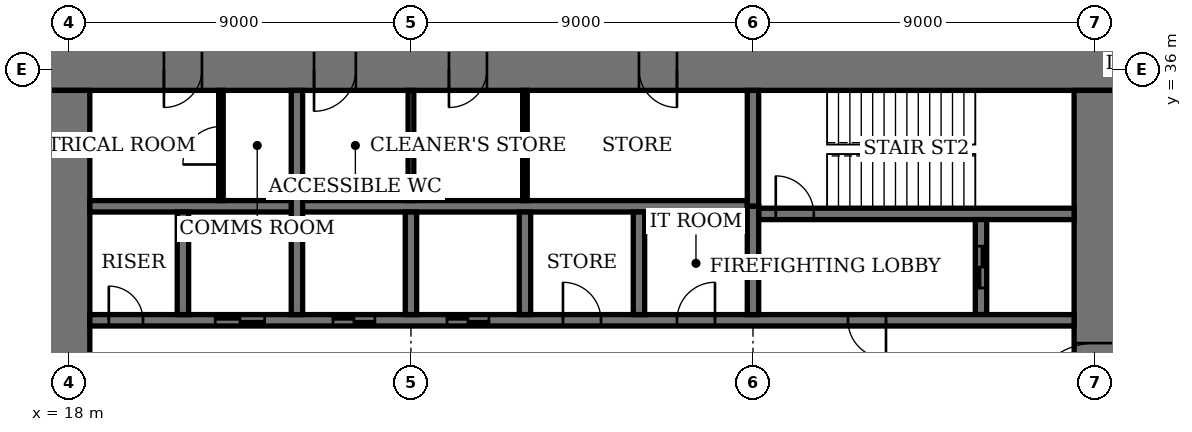
"""IFC4 building model, lengths in metres.
Left out: names, types, materials, properties, quantities, classifications, styles, units other than length and angle.
Written with IfcOpenShell. Run it as: python <this file> out.ifc"""

import sys

from ifc_helpers import new_model, si_unit, direction, frame, frame_2d, origin, place, context, subcontext, project, spatial, rectangle, extrude, element, fill, save


model = new_model("IFC4")
c1 = context("Model", 3, precision=1e-05, world=origin(), true_north=direction((0.0, 1.0)))
c2 = subcontext(c1, "Body", "Model", "MODEL_VIEW")
j1 = project(units=[si_unit("LENGTHUNIT", "METRE"), si_unit("PLANEANGLEUNIT", "RADIAN")], contexts=[c1])
p1 = place(None, origin())
s1 = spatial("IfcSite", under=j1, at=p1, CompositionType="ELEMENT")
p2 = place(p1, origin())
s2 = spatial("IfcBuilding", under=s1, at=p2, CompositionType="ELEMENT")
p3 = place(p2, frame((0.0, 0.0, 186.2)))
s3 = spatial("IfcBuildingStorey", under=s2, at=p3, CompositionType="ELEMENT", Elevation=186.2)
p4 = place(p3, frame((45.55, 36.0, 0.0), z_axis=(0.0, 0.0, 1.0), x_axis=(-1.0, 0.0, 0.0)))
e1 = element("IfcWall", 1, at=p4, inside=s3, PredefinedType="SHEAR", context=c2, shape_type="SweptSolid", body=[
    extrude(rectangle(XDim=28.1, YDim=1.1, at=frame_2d((14.05, 0.0))), origin(), (0.0, 0.0, 1.0), 4.0),
])
p5 = place(p4, frame((11.55, 0.0, 0.0)))
e2 = element("IfcOpeningElement", 2, at=p5, cuts=e1, PredefinedType="OPENING", context=c2, shape_type="SweptSolid", body=[
    extrude(rectangle(XDim=1.0, YDim=2.4, at=frame_2d((0.5, 1.2))), frame((0.0, 0.56, 0.0), z_axis=(0.0, -1.0, 0.0), x_axis=(1.0, 0.0, 0.0)), (0.0, 0.0, 1.0), 1.12),
])
p6 = place(p4, frame((16.55, 0.0, 0.0)))
e3 = element("IfcOpeningElement", 3, at=p6, cuts=e1, PredefinedType="OPENING", context=c2, shape_type="SweptSolid", body=[
    extrude(rectangle(XDim=1.0, YDim=2.4, at=frame_2d((0.5, 1.2))), frame((0.0, 0.56, 0.0), z_axis=(0.0, -1.0, 0.0), x_axis=(1.0, 0.0, 0.0)), (0.0, 0.0, 1.0), 1.12),
])
p7 = place(p4, frame((20.0, 0.0, 0.0)))
e4 = element("IfcOpeningElement", 4, at=p7, cuts=e1, PredefinedType="OPENING", context=c2, shape_type="SweptSolid", body=[
    extrude(rectangle(XDim=1.1, YDim=2.4, at=frame_2d((0.55, 1.2))), frame((0.0, 0.56, 0.0), z_axis=(0.0, -1.0, 0.0), x_axis=(1.0, 0.0, 0.0)), (0.0, 0.0, 1.0), 1.12),
])
p8 = place(p4, frame((24.05, 0.0, 0.0)))
e5 = element("IfcOpeningElement", 5, at=p8, cuts=e1, PredefinedType="OPENING", context=c2, shape_type="SweptSolid", body=[
    extrude(rectangle(XDim=1.0, YDim=2.4, at=frame_2d((0.5, 1.2))), frame((0.0, 0.56, 0.0), z_axis=(0.0, -1.0, 0.0), x_axis=(1.0, 0.0, 0.0)), (0.0, 0.0, 1.0), 1.12),
])
p9 = place(p3, frame((18.0, 35.45, 0.0), z_axis=(0.0, 0.0, 1.0), x_axis=(0.0, -1.0, 0.0)))
e6 = element("IfcWall", 6, at=p9, inside=s3, PredefinedType="SHEAR", context=c2, shape_type="SweptSolid", body=[
    extrude(rectangle(XDim=16.9, YDim=1.1, at=frame_2d((8.45, 0.0))), origin(), (0.0, 0.0, 1.0), 4.0),
])
p10 = place(p9, frame((8.45, 0.0, 0.0)))
e7 = element("IfcOpeningElement", 7, at=p10, cuts=e6, PredefinedType="OPENING", context=c2, shape_type="SweptSolid", body=[
    extrude(rectangle(XDim=1.8, YDim=2.4, at=frame_2d((0.9, 1.2))), frame((0.0, 0.56, 0.0), z_axis=(0.0, -1.0, 0.0), x_axis=(1.0, 0.0, 0.0)), (0.0, 0.0, 1.0), 1.12),
])
p11 = place(p3, frame((45.0, 18.55, 0.0), z_axis=(0.0, 0.0, 1.0), x_axis=(0.0, 1.0, 0.0)))
e8 = element("IfcWall", 8, at=p11, inside=s3, PredefinedType="SHEAR", context=c2, shape_type="SweptSolid", body=[
    extrude(rectangle(XDim=16.9, YDim=1.1, at=frame_2d((8.45, 0.0))), origin(), (0.0, 0.0, 1.0), 4.0),
])
p12 = place(p11, frame((8.45, 0.0, 0.0)))
e9 = element("IfcOpeningElement", 9, at=p12, cuts=e8, PredefinedType="OPENING", context=c2, shape_type="SweptSolid", body=[
    extrude(rectangle(XDim=1.8, YDim=2.4, at=frame_2d((0.9, 1.2))), frame((0.0, 0.56, 0.0), z_axis=(0.0, -1.0, 0.0), x_axis=(1.0, 0.0, 0.0)), (0.0, 0.0, 1.0), 1.12),
])
p13 = place(p3, frame((36.15, 32.2, 0.0), z_axis=(0.0, 0.0, 1.0), x_axis=(1.0, 0.0, 0.0)))
e10 = element("IfcWall", 10, at=p13, inside=s3, PredefinedType="SHEAR", context=c2, shape_type="SweptSolid", body=[
    extrude(rectangle(XDim=8.3, YDim=0.3, at=frame_2d((4.15, 0.0))), origin(), (0.0, 0.0, 1.0), 4.0),
])
p14 = place(p13, frame((0.45, 0.0, 0.0)))
e11 = element("IfcOpeningElement", 11, at=p14, cuts=e10, PredefinedType="OPENING", context=c2, shape_type="SweptSolid", body=[
    extrude(rectangle(XDim=1.0, YDim=2.4, at=frame_2d((0.5, 1.2))), frame((0.0, 0.16, 0.0), z_axis=(0.0, -1.0, 0.0), x_axis=(1.0, 0.0, 0.0)), (0.0, 0.0, 1.0), 0.32),
])
p15 = place(p3, frame((36.0, 32.4, 0.0), z_axis=(0.0, 0.0, 1.0), x_axis=(0.0, 1.0, 0.0)))
e12 = element("IfcWall", 12, at=p15, inside=s3, PredefinedType="SHEAR", context=c2, shape_type="SweptSolid", body=[
    extrude(rectangle(XDim=3.05, YDim=0.3, at=frame_2d((1.525, 0.0))), origin(), (0.0, 0.0, 1.0), 4.0),
])
p16 = place(p3, frame((42.0, 29.55, 0.0), z_axis=(0.0, 0.0, 1.0), x_axis=(0.0, 1.0, 0.0)))
e13 = element("IfcWall", 13, at=p16, inside=s3, PredefinedType="SHEAR", context=c2, shape_type="SweptSolid", body=[
    extrude(rectangle(XDim=2.5, YDim=0.3, at=frame_2d((1.25, 0.0))), origin(), (0.0, 0.0, 1.0), 4.0),
])
p17 = place(p16, frame((0.7, 0.0, 0.0)))
e14 = element("IfcOpeningElement", 14, at=p17, cuts=e13, PredefinedType="OPENING", context=c2, shape_type="SweptSolid", body=[
    extrude(rectangle(XDim=1.1, YDim=2.4, at=frame_2d((0.55, 1.2))), frame((0.0, 0.16, 0.0), z_axis=(0.0, -1.0, 0.0), x_axis=(1.0, 0.0, 0.0)), (0.0, 0.0, 1.0), 0.32),
])
p18 = place(p3, frame((18.55, 29.4, 0.0), z_axis=(0.0, 0.0, 1.0), x_axis=(1.0, 0.0, 0.0)))
e15 = element("IfcWall", 15, at=p18, inside=s3, PredefinedType="SHEAR", context=c2, shape_type="SweptSolid", body=[
    extrude(rectangle(XDim=25.9, YDim=0.3, at=frame_2d((12.95, 0.0))), origin(), (0.0, 0.0, 1.0), 4.0),
])
p19 = place(p18, frame((19.95, 0.0, 0.0)))
e16 = element("IfcOpeningElement", 16, at=p19, cuts=e15, PredefinedType="OPENING", context=c2, shape_type="SweptSolid", body=[
    extrude(rectangle(XDim=1.0, YDim=2.4, at=frame_2d((0.5, 1.2))), frame((0.0, 0.16, 0.0), z_axis=(0.0, -1.0, 0.0), x_axis=(1.0, 0.0, 0.0)), (0.0, 0.0, 1.0), 0.32),
])
p20 = place(p18, frame((0.5, 0.0, 0.0)))
e17 = element("IfcOpeningElement", 17, at=p20, cuts=e15, PredefinedType="OPENING", context=c2, shape_type="SweptSolid", body=[
    extrude(rectangle(XDim=0.9, YDim=2.1, at=frame_2d((0.45, 1.05))), frame((0.0, 0.16, 0.0), z_axis=(0.0, -1.0, 0.0), x_axis=(1.0, 0.0, 0.0)), (0.0, 0.0, 1.0), 0.32),
])
p21 = place(p18, frame((15.45, 0.0, 0.0)))
e18 = element("IfcOpeningElement", 18, at=p21, cuts=e15, PredefinedType="OPENING", context=c2, shape_type="SweptSolid", body=[
    extrude(rectangle(XDim=1.0, YDim=2.4, at=frame_2d((0.5, 1.2))), frame((0.0, 0.16, 0.0), z_axis=(0.0, -1.0, 0.0), x_axis=(1.0, 0.0, 0.0)), (0.0, 0.0, 1.0), 0.32),
])
p22 = place(p18, frame((12.45, 0.0, 0.0)))
e19 = element("IfcOpeningElement", 19, at=p22, cuts=e15, PredefinedType="OPENING", context=c2, shape_type="SweptSolid", body=[
    extrude(rectangle(XDim=1.0, YDim=2.4, at=frame_2d((0.5, 1.2))), frame((0.0, 0.16, 0.0), z_axis=(0.0, -1.0, 0.0), x_axis=(1.0, 0.0, 0.0)), (0.0, 0.0, 1.0), 0.32),
])
p23 = place(p18, frame((9.4, 0.0, 0.0)))
e20 = element("IfcOpeningElement", 20, at=p23, cuts=e15, PredefinedType="OPENING", context=c2, shape_type="SweptSolid", body=[
    extrude(rectangle(XDim=1.1, YDim=2.4, at=frame_2d((0.55, 1.2))), frame((0.0, 0.16, 0.0), z_axis=(0.0, -1.0, 0.0), x_axis=(1.0, 0.0, 0.0)), (0.0, 0.0, 1.0), 0.32),
])
p24 = place(p18, frame((6.4, 0.0, 0.0)))
e21 = element("IfcOpeningElement", 21, at=p24, cuts=e15, PredefinedType="OPENING", context=c2, shape_type="SweptSolid", body=[
    extrude(rectangle(XDim=1.1, YDim=2.4, at=frame_2d((0.55, 1.2))), frame((0.0, 0.16, 0.0), z_axis=(0.0, -1.0, 0.0), x_axis=(1.0, 0.0, 0.0)), (0.0, 0.0, 1.0), 0.32),
])
p25 = place(p18, frame((3.3, 0.0, 0.0)))
e22 = element("IfcOpeningElement", 22, at=p25, cuts=e15, PredefinedType="OPENING", context=c2, shape_type="SweptSolid", body=[
    extrude(rectangle(XDim=1.3, YDim=2.4, at=frame_2d((0.65, 1.2))), frame((0.0, 0.16, 0.0), z_axis=(0.0, -1.0, 0.0), x_axis=(1.0, 0.0, 0.0)), (0.0, 0.0, 1.0), 0.32),
])
p26 = place(p3, frame((18.55, 32.4, 0.0), z_axis=(0.0, 0.0, 1.0), x_axis=(1.0, 0.0, 0.0)))
e23 = element("IfcWall", 23, at=p26, inside=s3, PredefinedType="SHEAR", context=c2, shape_type="SweptSolid", body=[
    extrude(rectangle(XDim=17.3, YDim=0.3, at=frame_2d((8.65, 0.0))), origin(), (0.0, 0.0, 1.0), 4.0),
])
for number, where, z_axis, x_axis in (
    (24, (33.0, 29.55, 0.0), (0.0, 0.0, 1.0), (0.0, 1.0, 0.0)),
    (25, (30.0, 29.55, 0.0), (0.0, 0.0, 1.0), (0.0, 1.0, 0.0)),
    (26, (27.0, 29.55, 0.0), (0.0, 0.0, 1.0), (0.0, 1.0, 0.0)),
):
    element("IfcWall", number, at=place(p3, frame(where, z_axis=z_axis, x_axis=x_axis)), inside=s3, PredefinedType="SHEAR", context=c2, shape_type="SweptSolid", body=[
        extrude(rectangle(XDim=2.7, YDim=0.3, at=frame_2d((1.35, 0.0))), origin(), (0.0, 0.0, 1.0), 4.0),
    ])
p27 = place(p3, frame((24.0, 29.55, 0.0), z_axis=(0.0, 0.0, 1.0), x_axis=(0.0, 1.0, 0.0)))
e27 = element("IfcWall", 27, at=p27, inside=s3, PredefinedType="SHEAR", context=c2, shape_type="SweptSolid", body=[
    extrude(rectangle(XDim=5.9, YDim=0.3, at=frame_2d((2.95, 0.0))), origin(), (0.0, 0.0, 1.0), 4.0),
])
p28 = place(p3, frame((21.0, 29.55, 0.0), z_axis=(0.0, 0.0, 1.0), x_axis=(0.0, 1.0, 0.0)))
e28 = element("IfcWall", 28, at=p28, inside=s3, PredefinedType="SHEAR", context=c2, shape_type="SweptSolid", body=[
    extrude(rectangle(XDim=2.7, YDim=0.3, at=frame_2d((1.35, 0.0))), origin(), (0.0, 0.0, 1.0), 4.0),
])
p29 = place(p3, frame((36.0, 29.55, 0.0), z_axis=(0.0, 0.0, 1.0), x_axis=(0.0, 1.0, 0.0)))
e29 = element("IfcWall", 29, at=p29, inside=s3, PredefinedType="SHEAR", context=c2, shape_type="SweptSolid", body=[
    extrude(rectangle(XDim=2.85, YDim=0.3, at=frame_2d((1.425, 0.0))), origin(), (0.0, 0.0, 1.0), 4.0),
])
p30 = place(p3, frame((30.0, 32.55, 0.0), z_axis=(0.0, 0.0, 1.0), x_axis=(0.0, 1.0, 0.0)))
e30 = element("IfcWall", 30, at=p30, inside=s3, PredefinedType="PARTITIONING", context=c2, shape_type="SweptSolid", body=[
    extrude(rectangle(XDim=2.9, YDim=0.12, at=frame_2d((1.45, 0.0))), origin(), (0.0, 0.0, 1.0), 3.75),
])
p31 = place(p3, frame((27.0, 32.55, 0.0), z_axis=(0.0, 0.0, 1.0), x_axis=(0.0, 1.0, 0.0)))
e31 = element("IfcWall", 31, at=p31, inside=s3, PredefinedType="PARTITIONING", context=c2, shape_type="SweptSolid", body=[
    extrude(rectangle(XDim=2.9, YDim=0.15, at=frame_2d((1.45, 0.0))), origin(), (0.0, 0.0, 1.0), 3.75),
])
p32 = place(p3, frame((22.0, 32.55, 0.0), z_axis=(0.0, 0.0, 1.0), x_axis=(0.0, 1.0, 0.0)))
e32 = element("IfcWall", 32, at=p32, inside=s3, PredefinedType="PARTITIONING", context=c2, shape_type="SweptSolid", body=[
    extrude(rectangle(XDim=2.9, YDim=0.12, at=frame_2d((1.45, 0.0))), origin(), (0.0, 0.0, 1.0), 3.75),
])
p33 = place(p32, frame((0.95, 0.0, 0.0)))
e33 = element("IfcOpeningElement", 33, at=p33, cuts=e32, PredefinedType="OPENING", context=c2, shape_type="SweptSolid", body=[
    extrude(rectangle(XDim=1.0, YDim=2.4, at=frame_2d((0.5, 1.2))), frame((0.0, 0.07, 0.0), z_axis=(0.0, -1.0, 0.0), x_axis=(1.0, 0.0, 0.0)), (0.0, 0.0, 1.0), 0.14),
])
p34 = place(p12, origin())
e34 = element("IfcDoor", 34, at=p34, inside=s3, OperationType="DOUBLE_DOOR_DOUBLE_SWING", PredefinedType="DOOR", context=c2, shape_type="SweptSolid", body=[
    extrude(rectangle(XDim=1.8, YDim=2.4, at=frame_2d((0.9, 1.2))), frame((0.0, 0.03, 0.0), z_axis=(0.0, -1.0, 0.0), x_axis=(1.0, 0.0, 0.0)), (0.0, 0.0, 1.0), 0.06),
    extrude(rectangle(XDim=0.04, YDim=2.4, at=frame_2d((0.02, 1.2))), frame((0.0, 0.55, 0.0), z_axis=(0.0, -1.0, 0.0), x_axis=(1.0, 0.0, 0.0)), (0.0, 0.0, 1.0), 1.1),
    extrude(rectangle(XDim=0.04, YDim=2.4, at=frame_2d((1.78, 1.2))), frame((0.0, 0.55, 0.0), z_axis=(0.0, -1.0, 0.0), x_axis=(1.0, 0.0, 0.0)), (0.0, 0.0, 1.0), 1.1),
    extrude(rectangle(XDim=1.8, YDim=0.04, at=frame_2d((0.9, 2.38))), frame((0.0, 0.55, 0.0), z_axis=(0.0, -1.0, 0.0), x_axis=(1.0, 0.0, 0.0)), (0.0, 0.0, 1.0), 1.1),
])
fill(e9, e34)
p35 = place(p5, origin())
e35 = element("IfcDoor", 35, at=p35, inside=s3, OperationType="SINGLE_SWING_RIGHT", PredefinedType="DOOR", context=c2, shape_type="SweptSolid", body=[
    extrude(rectangle(XDim=1.0, YDim=2.4, at=frame_2d((0.5, 1.2))), frame((0.0, 0.025, 0.0), z_axis=(0.0, -1.0, 0.0), x_axis=(1.0, 0.0, 0.0)), (0.0, 0.0, 1.0), 0.05),
    extrude(rectangle(XDim=0.04, YDim=2.4, at=frame_2d((0.02, 1.2))), frame((0.0, 0.4, 0.0), z_axis=(0.0, -1.0, 0.0), x_axis=(1.0, 0.0, 0.0)), (0.0, 0.0, 1.0), 0.8),
    extrude(rectangle(XDim=0.04, YDim=2.4, at=frame_2d((0.98, 1.2))), frame((0.0, 0.4, 0.0), z_axis=(0.0, -1.0, 0.0), x_axis=(1.0, 0.0, 0.0)), (0.0, 0.0, 1.0), 0.8),
    extrude(rectangle(XDim=1.0, YDim=0.04, at=frame_2d((0.5, 2.38))), frame((0.0, 0.4, 0.0), z_axis=(0.0, -1.0, 0.0), x_axis=(1.0, 0.0, 0.0)), (0.0, 0.0, 1.0), 0.8),
])
fill(e2, e35)
p36 = place(p6, origin())
e36 = element("IfcDoor", 36, at=p36, inside=s3, OperationType="SINGLE_SWING_LEFT", PredefinedType="DOOR", context=c2, shape_type="SweptSolid", body=[
    extrude(rectangle(XDim=1.0, YDim=2.4, at=frame_2d((0.5, 1.2))), frame((0.0, 0.025, 0.0), z_axis=(0.0, -1.0, 0.0), x_axis=(1.0, 0.0, 0.0)), (0.0, 0.0, 1.0), 0.05),
    extrude(rectangle(XDim=0.04, YDim=2.4, at=frame_2d((0.02, 1.2))), frame((0.0, 0.4, 0.0), z_axis=(0.0, -1.0, 0.0), x_axis=(1.0, 0.0, 0.0)), (0.0, 0.0, 1.0), 0.8),
    extrude(rectangle(XDim=0.04, YDim=2.4, at=frame_2d((0.98, 1.2))), frame((0.0, 0.4, 0.0), z_axis=(0.0, -1.0, 0.0), x_axis=(1.0, 0.0, 0.0)), (0.0, 0.0, 1.0), 0.8),
    extrude(rectangle(XDim=1.0, YDim=0.04, at=frame_2d((0.5, 2.38))), frame((0.0, 0.4, 0.0), z_axis=(0.0, -1.0, 0.0), x_axis=(1.0, 0.0, 0.0)), (0.0, 0.0, 1.0), 0.8),
])
fill(e3, e36)
p37 = place(p7, origin())
e37 = element("IfcDoor", 37, at=p37, inside=s3, OperationType="SINGLE_SWING_LEFT", PredefinedType="DOOR", context=c2, shape_type="SweptSolid", body=[
    extrude(rectangle(XDim=1.1, YDim=2.4, at=frame_2d((0.55, 1.2))), frame((0.0, 0.025, 0.0), z_axis=(0.0, -1.0, 0.0), x_axis=(1.0, 0.0, 0.0)), (0.0, 0.0, 1.0), 0.05),
    extrude(rectangle(XDim=0.04, YDim=2.4, at=frame_2d((0.02, 1.2))), frame((0.0, 0.44, 0.0), z_axis=(0.0, -1.0, 0.0), x_axis=(1.0, 0.0, 0.0)), (0.0, 0.0, 1.0), 0.88),
    extrude(rectangle(XDim=0.04, YDim=2.4, at=frame_2d((1.08, 1.2))), frame((0.0, 0.44, 0.0), z_axis=(0.0, -1.0, 0.0), x_axis=(1.0, 0.0, 0.0)), (0.0, 0.0, 1.0), 0.88),
    extrude(rectangle(XDim=1.1, YDim=0.04, at=frame_2d((0.55, 2.38))), frame((0.0, 0.44, 0.0), z_axis=(0.0, -1.0, 0.0), x_axis=(1.0, 0.0, 0.0)), (0.0, 0.0, 1.0), 0.88),
])
fill(e4, e37)
p38 = place(p8, origin())
e38 = element("IfcDoor", 38, at=p38, inside=s3, OperationType="SINGLE_SWING_LEFT", PredefinedType="DOOR", context=c2, shape_type="SweptSolid", body=[
    extrude(rectangle(XDim=1.0, YDim=2.4, at=frame_2d((0.5, 1.2))), frame((0.0, 0.025, 0.0), z_axis=(0.0, -1.0, 0.0), x_axis=(1.0, 0.0, 0.0)), (0.0, 0.0, 1.0), 0.05),
    extrude(rectangle(XDim=0.04, YDim=2.4, at=frame_2d((0.02, 1.2))), frame((0.0, 0.4, 0.0), z_axis=(0.0, -1.0, 0.0), x_axis=(1.0, 0.0, 0.0)), (0.0, 0.0, 1.0), 0.8),
    extrude(rectangle(XDim=0.04, YDim=2.4, at=frame_2d((0.98, 1.2))), frame((0.0, 0.4, 0.0), z_axis=(0.0, -1.0, 0.0), x_axis=(1.0, 0.0, 0.0)), (0.0, 0.0, 1.0), 0.8),
    extrude(rectangle(XDim=1.0, YDim=0.04, at=frame_2d((0.5, 2.38))), frame((0.0, 0.4, 0.0), z_axis=(0.0, -1.0, 0.0), x_axis=(1.0, 0.0, 0.0)), (0.0, 0.0, 1.0), 0.8),
])
fill(e5, e38)
p39 = place(p14, origin())
e39 = element("IfcDoor", 39, at=p39, inside=s3, OperationType="SINGLE_SWING_RIGHT", PredefinedType="DOOR", context=c2, shape_type="SweptSolid", body=[
    extrude(rectangle(XDim=1.0, YDim=2.4, at=frame_2d((0.5, 1.2))), frame((0.0, 0.03, 0.0), z_axis=(0.0, -1.0, 0.0), x_axis=(1.0, 0.0, 0.0)), (0.0, 0.0, 1.0), 0.06),
])
fill(e11, e39)
p40 = place(p19, origin())
e40 = element("IfcDoor", 40, at=p40, inside=s3, OperationType="SINGLE_SWING_RIGHT", PredefinedType="DOOR", context=c2, shape_type="SweptSolid", body=[
    extrude(rectangle(XDim=1.0, YDim=2.4, at=frame_2d((0.5, 1.2))), frame((0.0, 0.03, 0.0), z_axis=(0.0, -1.0, 0.0), x_axis=(1.0, 0.0, 0.0)), (0.0, 0.0, 1.0), 0.06),
])
fill(e16, e40)
p41 = place(p20, origin())
e41 = element("IfcDoor", 41, at=p41, inside=s3, OperationType="SINGLE_SWING_RIGHT", PredefinedType="DOOR", context=c2, shape_type="SweptSolid", body=[
    extrude(rectangle(XDim=0.9, YDim=2.1, at=frame_2d((0.45, 1.05))), frame((0.0, 0.03, 0.0), z_axis=(0.0, -1.0, 0.0), x_axis=(1.0, 0.0, 0.0)), (0.0, 0.0, 1.0), 0.06),
])
fill(e17, e41)
p42 = place(p33, origin())
e42 = element("IfcDoor", 42, at=p42, inside=s3, OperationType="SINGLE_SWING_RIGHT", PredefinedType="DOOR", context=c2, shape_type="SweptSolid", body=[
    extrude(rectangle(XDim=1.0, YDim=2.4, at=frame_2d((0.5, 1.2))), frame((0.0, 0.03, 0.0), z_axis=(0.0, -1.0, 0.0), x_axis=(1.0, 0.0, 0.0)), (0.0, 0.0, 1.0), 0.06),
])
fill(e33, e42)
p43 = place(p21, origin())
e43 = element("IfcDoor", 43, at=p43, inside=s3, OperationType="SINGLE_SWING_LEFT", PredefinedType="DOOR", context=c2, shape_type="SweptSolid", body=[
    extrude(rectangle(XDim=1.0, YDim=2.4, at=frame_2d((0.5, 1.2))), frame((0.0, 0.03, 0.0), z_axis=(0.0, -1.0, 0.0), x_axis=(1.0, 0.0, 0.0)), (0.0, 0.0, 1.0), 0.06),
])
fill(e18, e43)
p44 = place(p22, origin())
e44 = element("IfcDoor", 44, at=p44, inside=s3, OperationType="SINGLE_SWING_RIGHT", PredefinedType="DOOR", context=c2, shape_type="SweptSolid", body=[
    extrude(rectangle(XDim=1.0, YDim=2.4, at=frame_2d((0.5, 1.2))), frame((0.0, 0.03, 0.0), z_axis=(0.0, -1.0, 0.0), x_axis=(1.0, 0.0, 0.0)), (0.0, 0.0, 1.0), 0.06),
])
fill(e19, e44)
p45 = place(p23, origin())
e45 = element("IfcDoor", 45, at=p45, inside=s3, OperationType="DOUBLE_DOOR_SLIDING", PredefinedType="DOOR", context=c2, shape_type="SweptSolid", body=[
    extrude(rectangle(XDim=1.1, YDim=2.4, at=frame_2d((0.55, 1.2))), frame((0.0, 0.02, 0.0), z_axis=(0.0, -1.0, 0.0), x_axis=(1.0, 0.0, 0.0)), (0.0, 0.0, 1.0), 0.04),
])
fill(e20, e45)
p46 = place(p24, origin())
e46 = element("IfcDoor", 46, at=p46, inside=s3, OperationType="DOUBLE_DOOR_SLIDING", PredefinedType="DOOR", context=c2, shape_type="SweptSolid", body=[
    extrude(rectangle(XDim=1.1, YDim=2.4, at=frame_2d((0.55, 1.2))), frame((0.0, 0.02, 0.0), z_axis=(0.0, -1.0, 0.0), x_axis=(1.0, 0.0, 0.0)), (0.0, 0.0, 1.0), 0.04),
])
fill(e21, e46)
p47 = place(p25, origin())
e47 = element("IfcDoor", 47, at=p47, inside=s3, OperationType="DOUBLE_DOOR_SLIDING", PredefinedType="DOOR", context=c2, shape_type="SweptSolid", body=[
    extrude(rectangle(XDim=1.3, YDim=2.4, at=frame_2d((0.65, 1.2))), frame((0.0, 0.02, 0.0), z_axis=(0.0, -1.0, 0.0), x_axis=(1.0, 0.0, 0.0)), (0.0, 0.0, 1.0), 0.04),
])
fill(e22, e47)
p48 = place(p17, origin())
e48 = element("IfcDoor", 48, at=p48, inside=s3, OperationType="DOUBLE_DOOR_SLIDING", PredefinedType="DOOR", context=c2, shape_type="SweptSolid", body=[
    extrude(rectangle(XDim=1.1, YDim=2.4, at=frame_2d((0.55, 1.2))), frame((0.0, 0.03, 0.0), z_axis=(0.0, -1.0, 0.0), x_axis=(1.0, 0.0, 0.0)), (0.0, 0.0, 1.0), 0.06),
])
fill(e14, e48)
save(model, sys.argv[1])
